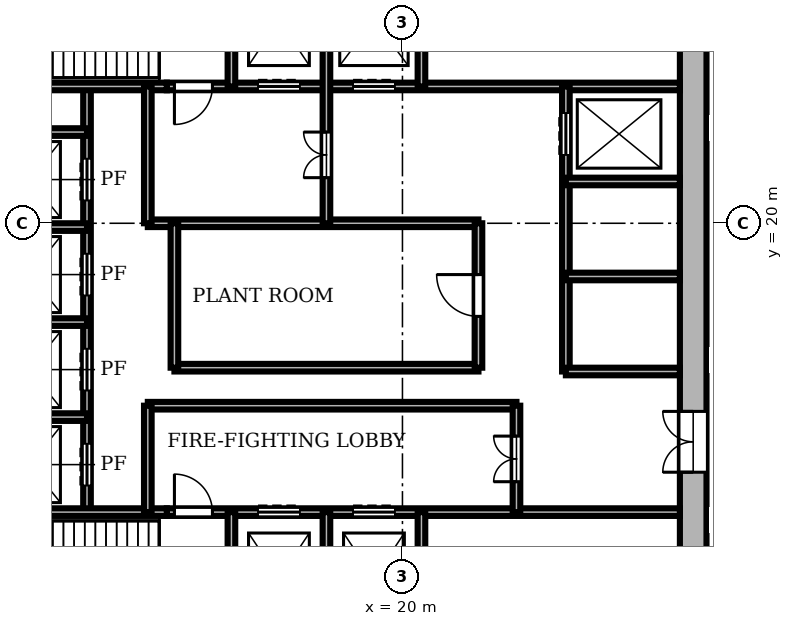
"""IFC4 building model, lengths in metres.
Left out: names, types, materials, properties, quantities, classifications, styles, units other than length and angle.
Written with IfcOpenShell. Run it as: python <this file> out.ifc"""

import sys

from ifc_helpers import new_model, si_unit, direction, frame, frame_2d, origin, place, context, subcontext, project, spatial, rectangle, extrude, element, fill, save


model = new_model("IFC4")
c1 = context("Model", 3, precision=1e-05, world=origin(), true_north=direction((0.0, 1.0)))
c2 = subcontext(c1, "Body", "Model", "MODEL_VIEW")
j1 = project(units=[si_unit("LENGTHUNIT", "METRE"), si_unit("PLANEANGLEUNIT", "RADIAN")], contexts=[c1])
p1 = place(None, origin())
s1 = spatial("IfcSite", under=j1, at=p1, CompositionType="ELEMENT")
p2 = place(p1, origin())
s2 = spatial("IfcBuilding", under=s1, at=p2, CompositionType="ELEMENT")
p3 = place(p2, frame((0.0, 0.0, 237.0)))
s3 = spatial("IfcBuildingStorey", under=s2, at=p3, CompositionType="ELEMENT", Elevation=237.0)
p4 = place(p3, frame((27.65, 8.7, 0.0), z_axis=(0.0, 0.0, 1.0), x_axis=(0.0, 1.0, 0.0)))
e1 = element("IfcWall", 1, at=p4, inside=s3, PredefinedType="SHEAR", context=c2, shape_type="SweptSolid", body=[
    extrude(rectangle(XDim=18.6, YDim=0.7, at=frame_2d((9.3, 0.0))), origin(), (0.0, 0.0, 1.0), 9.0),
])
p5 = place(p4, frame((4.75, 0.0, 0.0)))
e2 = element("IfcOpeningElement", 2, at=p5, cuts=e1, PredefinedType="OPENING", context=c2, shape_type="SweptSolid", body=[
    extrude(rectangle(XDim=1.6, YDim=2.1, at=frame_2d((0.8, 1.05))), frame((0.0, 0.36, 0.0), z_axis=(0.0, -1.0, 0.0), x_axis=(1.0, 0.0, 0.0)), (0.0, 0.0, 1.0), 0.72),
])
p6 = place(p3, frame((8.7, 12.4, 0.0), z_axis=(0.0, 0.0, 1.0), x_axis=(1.0, 0.0, 0.0)))
e3 = element("IfcWall", 3, at=p6, inside=s3, PredefinedType="SHEAR", context=c2, shape_type="SweptSolid", body=[
    extrude(rectangle(XDim=5.1, YDim=0.2, at=frame_2d((2.55, 0.0))), origin(), (0.0, 0.0, 1.0), 8.55),
])
p7 = place(p3, frame((13.8, 12.4, 0.0), z_axis=(0.0, 0.0, 1.0), x_axis=(1.0, 0.0, 0.0)))
e4 = element("IfcWall", 4, at=p7, inside=s3, PredefinedType="SHEAR", context=c2, shape_type="SweptSolid", body=[
    extrude(rectangle(XDim=13.5, YDim=0.2, at=frame_2d((6.75, 0.0))), origin(), (0.0, 0.0, 1.0), 8.55),
])
p8 = place(p7, frame((2.4, 0.0, 0.0)))
e5 = element("IfcOpeningElement", 5, at=p8, cuts=e4, PredefinedType="OPENING", context=c2, shape_type="SweptSolid", body=[
    extrude(rectangle(XDim=1.1, YDim=2.1, at=frame_2d((0.55, 1.05))), frame((0.0, 0.11, 0.0), z_axis=(0.0, -1.0, 0.0), x_axis=(1.0, 0.0, 0.0)), (0.0, 0.0, 1.0), 0.22),
])
p9 = place(p7, frame((4.9, 0.0, 0.0)))
e6 = element("IfcOpeningElement", 6, at=p9, cuts=e4, PredefinedType="OPENING", context=c2, shape_type="SweptSolid", body=[
    extrude(rectangle(XDim=1.1, YDim=2.1, at=frame_2d((0.55, 1.05))), frame((0.0, 0.11, 0.0), z_axis=(0.0, -1.0, 0.0), x_axis=(1.0, 0.0, 0.0)), (0.0, 0.0, 1.0), 0.22),
])
p10 = place(p7, frame((0.2, 0.0, 0.0)))
e7 = element("IfcOpeningElement", 7, at=p10, cuts=e4, PredefinedType="OPENING", context=c2, shape_type="SweptSolid", body=[
    extrude(rectangle(XDim=1.0, YDim=2.1, at=frame_2d((0.5, 1.05))), frame((0.0, 0.11, 0.0), z_axis=(0.0, -1.0, 0.0), x_axis=(1.0, 0.0, 0.0)), (0.0, 0.0, 1.0), 0.22),
])
p11 = place(p3, frame((8.7, 14.9, 0.0), z_axis=(0.0, 0.0, 1.0), x_axis=(1.0, 0.0, 0.0)))
e8 = element("IfcWall", 8, at=p11, inside=s3, PredefinedType="SHEAR", context=c2, shape_type="SweptSolid", body=[
    extrude(rectangle(XDim=3.0, YDim=0.2, at=frame_2d((1.5, 0.0))), origin(), (0.0, 0.0, 1.0), 8.55),
])
p12 = place(p3, frame((13.3, 15.2, 0.0), z_axis=(0.0, 0.0, 1.0), x_axis=(1.0, 0.0, 0.0)))
e9 = element("IfcWall", 9, at=p12, inside=s3, PredefinedType="SHEAR", context=c2, shape_type="SweptSolid", body=[
    extrude(rectangle(XDim=9.7, YDim=0.2, at=frame_2d((4.85, 0.0))), origin(), (0.0, 0.0, 1.0), 8.55),
])
p13 = place(p3, frame((24.3, 16.1, 0.0), z_axis=(0.0, 0.0, 1.0), x_axis=(1.0, 0.0, 0.0)))
e10 = element("IfcWall", 10, at=p13, inside=s3, PredefinedType="SHEAR", context=c2, shape_type="SweptSolid", body=[
    extrude(rectangle(XDim=3.0, YDim=0.2, at=frame_2d((1.5, 0.0))), origin(), (0.0, 0.0, 1.0), 8.55),
])
p14 = place(p3, frame((14.0, 16.2, 0.0), z_axis=(0.0, 0.0, 1.0), x_axis=(1.0, 0.0, 0.0)))
e11 = element("IfcWall", 11, at=p14, inside=s3, PredefinedType="SHEAR", context=c2, shape_type="SweptSolid", body=[
    extrude(rectangle(XDim=8.0, YDim=0.2, at=frame_2d((4.0, 0.0))), origin(), (0.0, 0.0, 1.0), 8.55),
])
for number, where, z_axis, x_axis in (
    (12, (8.7, 17.4, 0.0), (0.0, 0.0, 1.0), (1.0, 0.0, 0.0)),
    (13, (24.3, 18.6, 0.0), (0.0, 0.0, 1.0), (1.0, 0.0, 0.0)),
    (14, (8.7, 19.9, 0.0), (0.0, 0.0, 1.0), (1.0, 0.0, 0.0)),
):
    element("IfcWall", number, at=place(p3, frame(where, z_axis=z_axis, x_axis=x_axis)), inside=s3, PredefinedType="SHEAR", context=c2, shape_type="SweptSolid", body=[
        extrude(rectangle(XDim=3.0, YDim=0.2, at=frame_2d((1.5, 0.0))), origin(), (0.0, 0.0, 1.0), 8.55),
    ])
p15 = place(p3, frame((13.3, 20.0, 0.0), z_axis=(0.0, 0.0, 1.0), x_axis=(1.0, 0.0, 0.0)))
e15 = element("IfcWall", 15, at=p15, inside=s3, PredefinedType="SHEAR", context=c2, shape_type="SweptSolid", body=[
    extrude(rectangle(XDim=8.7, YDim=0.2, at=frame_2d((4.35, 0.0))), origin(), (0.0, 0.0, 1.0), 8.55),
])
for number, where, z_axis, x_axis in (
    (16, (24.3, 21.1, 0.0), (0.0, 0.0, 1.0), (1.0, 0.0, 0.0)),
    (17, (8.7, 22.4, 0.0), (0.0, 0.0, 1.0), (1.0, 0.0, 0.0)),
):
    element("IfcWall", number, at=place(p3, frame(where, z_axis=z_axis, x_axis=x_axis)), inside=s3, PredefinedType="SHEAR", context=c2, shape_type="SweptSolid", body=[
        extrude(rectangle(XDim=3.0, YDim=0.2, at=frame_2d((1.5, 0.0))), origin(), (0.0, 0.0, 1.0), 8.55),
    ])
p16 = place(p3, frame((8.7, 23.6, 0.0), z_axis=(0.0, 0.0, 1.0), x_axis=(1.0, 0.0, 0.0)))
e18 = element("IfcWall", 18, at=p16, inside=s3, PredefinedType="SHEAR", context=c2, shape_type="SweptSolid", body=[
    extrude(rectangle(XDim=5.1, YDim=0.2, at=frame_2d((2.55, 0.0))), origin(), (0.0, 0.0, 1.0), 8.55),
])
p17 = place(p3, frame((13.8, 23.6, 0.0), z_axis=(0.0, 0.0, 1.0), x_axis=(1.0, 0.0, 0.0)))
e19 = element("IfcWall", 19, at=p17, inside=s3, PredefinedType="SHEAR", context=c2, shape_type="SweptSolid", body=[
    extrude(rectangle(XDim=13.5, YDim=0.2, at=frame_2d((6.75, 0.0))), origin(), (0.0, 0.0, 1.0), 8.55),
])
p18 = place(p17, frame((2.4, 0.0, 0.0)))
e20 = element("IfcOpeningElement", 20, at=p18, cuts=e19, PredefinedType="OPENING", context=c2, shape_type="SweptSolid", body=[
    extrude(rectangle(XDim=1.1, YDim=2.1, at=frame_2d((0.55, 1.05))), frame((0.0, 0.11, 0.0), z_axis=(0.0, -1.0, 0.0), x_axis=(1.0, 0.0, 0.0)), (0.0, 0.0, 1.0), 0.22),
])
p19 = place(p17, frame((4.9, 0.0, 0.0)))
e21 = element("IfcOpeningElement", 21, at=p19, cuts=e19, PredefinedType="OPENING", context=c2, shape_type="SweptSolid", body=[
    extrude(rectangle(XDim=1.1, YDim=2.1, at=frame_2d((0.55, 1.05))), frame((0.0, 0.11, 0.0), z_axis=(0.0, -1.0, 0.0), x_axis=(1.0, 0.0, 0.0)), (0.0, 0.0, 1.0), 0.22),
])
p20 = place(p17, frame((0.2, 0.0, 0.0)))
e22 = element("IfcOpeningElement", 22, at=p20, cuts=e19, PredefinedType="OPENING", context=c2, shape_type="SweptSolid", body=[
    extrude(rectangle(XDim=1.0, YDim=2.1, at=frame_2d((0.5, 1.05))), frame((0.0, 0.11, 0.0), z_axis=(0.0, -1.0, 0.0), x_axis=(1.0, 0.0, 0.0)), (0.0, 0.0, 1.0), 0.22),
])
p21 = place(p3, frame((11.7, 12.4, 0.0), z_axis=(0.0, 0.0, 1.0), x_axis=(0.0, 1.0, 0.0)))
e23 = element("IfcWall", 23, at=p21, inside=s3, PredefinedType="SHEAR", context=c2, shape_type="SweptSolid", body=[
    extrude(rectangle(XDim=11.2, YDim=0.2, at=frame_2d((5.6, 0.0))), origin(), (0.0, 0.0, 1.0), 8.55),
])
p22 = place(p21, frame((0.7, 0.0, 0.0)))
e24 = element("IfcOpeningElement", 24, at=p22, cuts=e23, PredefinedType="OPENING", context=c2, shape_type="SweptSolid", body=[
    extrude(rectangle(XDim=1.1, YDim=2.1, at=frame_2d((0.55, 1.05))), frame((0.0, 0.11, 0.0), z_axis=(0.0, -1.0, 0.0), x_axis=(1.0, 0.0, 0.0)), (0.0, 0.0, 1.0), 0.22),
])
p23 = place(p21, frame((3.2, 0.0, 0.0)))
e25 = element("IfcOpeningElement", 25, at=p23, cuts=e23, PredefinedType="OPENING", context=c2, shape_type="SweptSolid", body=[
    extrude(rectangle(XDim=1.1, YDim=2.1, at=frame_2d((0.55, 1.05))), frame((0.0, 0.11, 0.0), z_axis=(0.0, -1.0, 0.0), x_axis=(1.0, 0.0, 0.0)), (0.0, 0.0, 1.0), 0.22),
])
p24 = place(p21, frame((5.7, 0.0, 0.0)))
e26 = element("IfcOpeningElement", 26, at=p24, cuts=e23, PredefinedType="OPENING", context=c2, shape_type="SweptSolid", body=[
    extrude(rectangle(XDim=1.1, YDim=2.1, at=frame_2d((0.55, 1.05))), frame((0.0, 0.11, 0.0), z_axis=(0.0, -1.0, 0.0), x_axis=(1.0, 0.0, 0.0)), (0.0, 0.0, 1.0), 0.22),
])
p25 = place(p21, frame((8.2, 0.0, 0.0)))
e27 = element("IfcOpeningElement", 27, at=p25, cuts=e23, PredefinedType="OPENING", context=c2, shape_type="SweptSolid", body=[
    extrude(rectangle(XDim=1.1, YDim=2.1, at=frame_2d((0.55, 1.05))), frame((0.0, 0.11, 0.0), z_axis=(0.0, -1.0, 0.0), x_axis=(1.0, 0.0, 0.0)), (0.0, 0.0, 1.0), 0.22),
])
p26 = place(p3, frame((13.3, 12.4, 0.0), z_axis=(0.0, 0.0, 1.0), x_axis=(0.0, 1.0, 0.0)))
e28 = element("IfcWall", 28, at=p26, inside=s3, PredefinedType="SHEAR", context=c2, shape_type="SweptSolid", body=[
    extrude(rectangle(XDim=2.8, YDim=0.2, at=frame_2d((1.4, 0.0))), origin(), (0.0, 0.0, 1.0), 8.55),
])
p27 = place(p3, frame((13.3, 20.0, 0.0), z_axis=(0.0, 0.0, 1.0), x_axis=(0.0, 1.0, 0.0)))
e29 = element("IfcWall", 29, at=p27, inside=s3, PredefinedType="SHEAR", context=c2, shape_type="SweptSolid", body=[
    extrude(rectangle(XDim=3.6, YDim=0.2, at=frame_2d((1.8, 0.0))), origin(), (0.0, 0.0, 1.0), 8.55),
])
p28 = place(p3, frame((14.0, 16.2, 0.0), z_axis=(0.0, 0.0, 1.0), x_axis=(0.0, 1.0, 0.0)))
e30 = element("IfcWall", 30, at=p28, inside=s3, PredefinedType="SHEAR", context=c2, shape_type="SweptSolid", body=[
    extrude(rectangle(XDim=3.8, YDim=0.2, at=frame_2d((1.9, 0.0))), origin(), (0.0, 0.0, 1.0), 8.55),
])
for number, where, z_axis, x_axis in (
    (31, (15.5, 8.7, 0.0), (0.0, 0.0, 1.0), (0.0, 1.0, 0.0)),
    (32, (15.5, 23.6, 0.0), (0.0, 0.0, 1.0), (0.0, 1.0, 0.0)),
    (33, (18.0, 8.7, 0.0), (0.0, 0.0, 1.0), (0.0, 1.0, 0.0)),
):
    element("IfcWall", number, at=place(p3, frame(where, z_axis=z_axis, x_axis=x_axis)), inside=s3, PredefinedType="SHEAR", context=c2, shape_type="SweptSolid", body=[
        extrude(rectangle(XDim=3.7, YDim=0.2, at=frame_2d((1.85, 0.0))), origin(), (0.0, 0.0, 1.0), 8.55),
    ])
p29 = place(p3, frame((18.0, 20.0, 0.0), z_axis=(0.0, 0.0, 1.0), x_axis=(0.0, 1.0, 0.0)))
e34 = element("IfcWall", 34, at=p29, inside=s3, PredefinedType="SHEAR", context=c2, shape_type="SweptSolid", body=[
    extrude(rectangle(XDim=7.3, YDim=0.2, at=frame_2d((3.65, 0.0))), origin(), (0.0, 0.0, 1.0), 8.55),
])
p30 = place(p29, frame((1.2, 0.0, 0.0)))
e35 = element("IfcOpeningElement", 35, at=p30, cuts=e34, PredefinedType="OPENING", context=c2, shape_type="SweptSolid", body=[
    extrude(rectangle(XDim=1.2, YDim=2.1, at=frame_2d((0.6, 1.05))), frame((0.0, 0.11, 0.0), z_axis=(0.0, -1.0, 0.0), x_axis=(1.0, 0.0, 0.0)), (0.0, 0.0, 1.0), 0.22),
])
for number, where, z_axis, x_axis in (
    (36, (20.5, 8.7, 0.0), (0.0, 0.0, 1.0), (0.0, 1.0, 0.0)),
    (37, (20.5, 23.6, 0.0), (0.0, 0.0, 1.0), (0.0, 1.0, 0.0)),
):
    element("IfcWall", number, at=place(p3, frame(where, z_axis=z_axis, x_axis=x_axis)), inside=s3, PredefinedType="SHEAR", context=c2, shape_type="SweptSolid", body=[
        extrude(rectangle(XDim=3.7, YDim=0.2, at=frame_2d((1.85, 0.0))), origin(), (0.0, 0.0, 1.0), 8.55),
    ])
p31 = place(p3, frame((22.0, 16.2, 0.0), z_axis=(0.0, 0.0, 1.0), x_axis=(0.0, 1.0, 0.0)))
e38 = element("IfcWall", 38, at=p31, inside=s3, PredefinedType="SHEAR", context=c2, shape_type="SweptSolid", body=[
    extrude(rectangle(XDim=3.8, YDim=0.2, at=frame_2d((1.9, 0.0))), origin(), (0.0, 0.0, 1.0), 8.55),
])
p32 = place(p31, frame((1.35, 0.0, 0.0)))
e39 = element("IfcOpeningElement", 39, at=p32, cuts=e38, PredefinedType="OPENING", context=c2, shape_type="SweptSolid", body=[
    extrude(rectangle(XDim=1.1, YDim=2.1, at=frame_2d((0.55, 1.05))), frame((0.0, 0.11, 0.0), z_axis=(0.0, -1.0, 0.0), x_axis=(1.0, 0.0, 0.0)), (0.0, 0.0, 1.0), 0.22),
])
p33 = place(p3, frame((23.0, 12.4, 0.0), z_axis=(0.0, 0.0, 1.0), x_axis=(0.0, 1.0, 0.0)))
e40 = element("IfcWall", 40, at=p33, inside=s3, PredefinedType="SHEAR", context=c2, shape_type="SweptSolid", body=[
    extrude(rectangle(XDim=2.8, YDim=0.2, at=frame_2d((1.4, 0.0))), origin(), (0.0, 0.0, 1.0), 8.55),
])
p34 = place(p33, frame((0.8, 0.0, 0.0)))
e41 = element("IfcOpeningElement", 41, at=p34, cuts=e40, PredefinedType="OPENING", context=c2, shape_type="SweptSolid", body=[
    extrude(rectangle(XDim=1.2, YDim=2.1, at=frame_2d((0.6, 1.05))), frame((0.0, 0.11, 0.0), z_axis=(0.0, -1.0, 0.0), x_axis=(1.0, 0.0, 0.0)), (0.0, 0.0, 1.0), 0.22),
])
p35 = place(p3, frame((24.3, 16.1, 0.0), z_axis=(0.0, 0.0, 1.0), x_axis=(0.0, 1.0, 0.0)))
e42 = element("IfcWall", 42, at=p35, inside=s3, PredefinedType="SHEAR", context=c2, shape_type="SweptSolid", body=[
    extrude(rectangle(XDim=7.5, YDim=0.2, at=frame_2d((3.75, 0.0))), origin(), (0.0, 0.0, 1.0), 8.55),
])
p36 = place(p35, frame((5.7, 0.0, 0.0)))
e43 = element("IfcOpeningElement", 43, at=p36, cuts=e42, PredefinedType="OPENING", context=c2, shape_type="SweptSolid", body=[
    extrude(rectangle(XDim=1.1, YDim=2.1, at=frame_2d((0.55, 1.05))), frame((0.0, 0.11, 0.0), z_axis=(0.0, -1.0, 0.0), x_axis=(1.0, 0.0, 0.0)), (0.0, 0.0, 1.0), 0.22),
])
for number, where, z_axis, x_axis in (
    (44, (8.8, 12.6, 7.5), (0.0, 0.0, 1.0), (1.0, 0.0, 0.0)),
    (45, (8.8, 14.7, 7.5), (0.0, 0.0, 1.0), (1.0, 0.0, 0.0)),
):
    element("IfcWall", number, at=place(p3, frame(where, z_axis=z_axis, x_axis=x_axis)), inside=s3, PredefinedType="SOLIDWALL", context=c2, shape_type="SweptSolid", body=[
        extrude(rectangle(XDim=2.8, YDim=0.2, at=frame_2d((1.4, 0.0))), origin(), (0.0, 0.0, 1.0), 1.5),
    ])
p37 = place(p3, frame((11.5, 12.7, 7.5), z_axis=(0.0, 0.0, 1.0), x_axis=(0.0, 1.0, 0.0)))
e46 = element("IfcWall", 46, at=p37, inside=s3, PredefinedType="SOLIDWALL", context=c2, shape_type="SweptSolid", body=[
    extrude(rectangle(XDim=1.9, YDim=0.2, at=frame_2d((0.95, 0.0))), origin(), (0.0, 0.0, 1.0), 1.5),
])
for number, where, z_axis, x_axis in (
    (47, (8.8, 15.1, 7.5), (0.0, 0.0, 1.0), (1.0, 0.0, 0.0)),
    (48, (8.8, 17.2, 7.5), (0.0, 0.0, 1.0), (1.0, 0.0, 0.0)),
):
    element("IfcWall", number, at=place(p3, frame(where, z_axis=z_axis, x_axis=x_axis)), inside=s3, PredefinedType="SOLIDWALL", context=c2, shape_type="SweptSolid", body=[
        extrude(rectangle(XDim=2.8, YDim=0.2, at=frame_2d((1.4, 0.0))), origin(), (0.0, 0.0, 1.0), 1.5),
    ])
p38 = place(p3, frame((11.5, 15.2, 7.5), z_axis=(0.0, 0.0, 1.0), x_axis=(0.0, 1.0, 0.0)))
e49 = element("IfcWall", 49, at=p38, inside=s3, PredefinedType="SOLIDWALL", context=c2, shape_type="SweptSolid", body=[
    extrude(rectangle(XDim=1.9, YDim=0.2, at=frame_2d((0.95, 0.0))), origin(), (0.0, 0.0, 1.0), 1.5),
])
for number, where, z_axis, x_axis in (
    (50, (8.8, 17.6, 7.5), (0.0, 0.0, 1.0), (1.0, 0.0, 0.0)),
    (51, (8.8, 19.7, 7.5), (0.0, 0.0, 1.0), (1.0, 0.0, 0.0)),
):
    element("IfcWall", number, at=place(p3, frame(where, z_axis=z_axis, x_axis=x_axis)), inside=s3, PredefinedType="SOLIDWALL", context=c2, shape_type="SweptSolid", body=[
        extrude(rectangle(XDim=2.8, YDim=0.2, at=frame_2d((1.4, 0.0))), origin(), (0.0, 0.0, 1.0), 1.5),
    ])
p39 = place(p3, frame((11.5, 17.7, 7.5), z_axis=(0.0, 0.0, 1.0), x_axis=(0.0, 1.0, 0.0)))
e52 = element("IfcWall", 52, at=p39, inside=s3, PredefinedType="SOLIDWALL", context=c2, shape_type="SweptSolid", body=[
    extrude(rectangle(XDim=1.9, YDim=0.2, at=frame_2d((0.95, 0.0))), origin(), (0.0, 0.0, 1.0), 1.5),
])
for number, where, z_axis, x_axis in (
    (53, (8.8, 20.1, 7.5), (0.0, 0.0, 1.0), (1.0, 0.0, 0.0)),
    (54, (8.8, 22.2, 7.5), (0.0, 0.0, 1.0), (1.0, 0.0, 0.0)),
):
    element("IfcWall", number, at=place(p3, frame(where, z_axis=z_axis, x_axis=x_axis)), inside=s3, PredefinedType="SOLIDWALL", context=c2, shape_type="SweptSolid", body=[
        extrude(rectangle(XDim=2.8, YDim=0.2, at=frame_2d((1.4, 0.0))), origin(), (0.0, 0.0, 1.0), 1.5),
    ])
p40 = place(p3, frame((11.5, 20.2, 7.5), z_axis=(0.0, 0.0, 1.0), x_axis=(0.0, 1.0, 0.0)))
e55 = element("IfcWall", 55, at=p40, inside=s3, PredefinedType="SOLIDWALL", context=c2, shape_type="SweptSolid", body=[
    extrude(rectangle(XDim=1.9, YDim=0.2, at=frame_2d((0.95, 0.0))), origin(), (0.0, 0.0, 1.0), 1.5),
])
p41 = place(p22, origin())
e56 = element("IfcDoor", 56, at=p41, inside=s3, OperationType="DOUBLE_DOOR_SLIDING", PredefinedType="DOOR", context=c2, shape_type="SweptSolid", body=[
    extrude(rectangle(XDim=1.1, YDim=2.1, at=frame_2d((0.55, 1.05))), frame((0.0, 0.025, 0.0), z_axis=(0.0, -1.0, 0.0), x_axis=(1.0, 0.0, 0.0)), (0.0, 0.0, 1.0), 0.05),
])
fill(e24, e56)
p42 = place(p23, origin())
e57 = element("IfcDoor", 57, at=p42, inside=s3, OperationType="DOUBLE_DOOR_SLIDING", PredefinedType="DOOR", context=c2, shape_type="SweptSolid", body=[
    extrude(rectangle(XDim=1.1, YDim=2.1, at=frame_2d((0.55, 1.05))), frame((0.0, 0.025, 0.0), z_axis=(0.0, -1.0, 0.0), x_axis=(1.0, 0.0, 0.0)), (0.0, 0.0, 1.0), 0.05),
])
fill(e25, e57)
p43 = place(p24, origin())
e58 = element("IfcDoor", 58, at=p43, inside=s3, OperationType="DOUBLE_DOOR_SLIDING", PredefinedType="DOOR", context=c2, shape_type="SweptSolid", body=[
    extrude(rectangle(XDim=1.1, YDim=2.1, at=frame_2d((0.55, 1.05))), frame((0.0, 0.025, 0.0), z_axis=(0.0, -1.0, 0.0), x_axis=(1.0, 0.0, 0.0)), (0.0, 0.0, 1.0), 0.05),
])
fill(e26, e58)
p44 = place(p25, origin())
e59 = element("IfcDoor", 59, at=p44, inside=s3, OperationType="DOUBLE_DOOR_SLIDING", PredefinedType="DOOR", context=c2, shape_type="SweptSolid", body=[
    extrude(rectangle(XDim=1.1, YDim=2.1, at=frame_2d((0.55, 1.05))), frame((0.0, 0.025, 0.0), z_axis=(0.0, -1.0, 0.0), x_axis=(1.0, 0.0, 0.0)), (0.0, 0.0, 1.0), 0.05),
])
fill(e27, e59)
p45 = place(p36, origin())
e60 = element("IfcDoor", 60, at=p45, inside=s3, OperationType="DOUBLE_DOOR_SLIDING", PredefinedType="DOOR", context=c2, shape_type="SweptSolid", body=[
    extrude(rectangle(XDim=1.1, YDim=2.1, at=frame_2d((0.55, 1.05))), frame((0.0, 0.025, 0.0), z_axis=(0.0, -1.0, 0.0), x_axis=(1.0, 0.0, 0.0)), (0.0, 0.0, 1.0), 0.05),
])
fill(e43, e60)
p46 = place(p8, origin())
e61 = element("IfcDoor", 61, at=p46, inside=s3, OperationType="DOUBLE_DOOR_SLIDING", PredefinedType="DOOR", context=c2, shape_type="SweptSolid", body=[
    extrude(rectangle(XDim=1.1, YDim=2.1, at=frame_2d((0.55, 1.05))), frame((0.0, 0.025, 0.0), z_axis=(0.0, -1.0, 0.0), x_axis=(1.0, 0.0, 0.0)), (0.0, 0.0, 1.0), 0.05),
])
fill(e5, e61)
p47 = place(p9, origin())
e62 = element("IfcDoor", 62, at=p47, inside=s3, OperationType="DOUBLE_DOOR_SLIDING", PredefinedType="DOOR", context=c2, shape_type="SweptSolid", body=[
    extrude(rectangle(XDim=1.1, YDim=2.1, at=frame_2d((0.55, 1.05))), frame((0.0, 0.025, 0.0), z_axis=(0.0, -1.0, 0.0), x_axis=(1.0, 0.0, 0.0)), (0.0, 0.0, 1.0), 0.05),
])
fill(e6, e62)
p48 = place(p18, origin())
e63 = element("IfcDoor", 63, at=p48, inside=s3, OperationType="DOUBLE_DOOR_SLIDING", PredefinedType="DOOR", context=c2, shape_type="SweptSolid", body=[
    extrude(rectangle(XDim=1.1, YDim=2.1, at=frame_2d((0.55, 1.05))), frame((0.0, 0.025, 0.0), z_axis=(0.0, -1.0, 0.0), x_axis=(1.0, 0.0, 0.0)), (0.0, 0.0, 1.0), 0.05),
])
fill(e20, e63)
p49 = place(p19, origin())
e64 = element("IfcDoor", 64, at=p49, inside=s3, OperationType="DOUBLE_DOOR_SLIDING", PredefinedType="DOOR", context=c2, shape_type="SweptSolid", body=[
    extrude(rectangle(XDim=1.1, YDim=2.1, at=frame_2d((0.55, 1.05))), frame((0.0, 0.025, 0.0), z_axis=(0.0, -1.0, 0.0), x_axis=(1.0, 0.0, 0.0)), (0.0, 0.0, 1.0), 0.05),
])
fill(e21, e64)
p50 = place(p10, origin())
e65 = element("IfcDoor", 65, at=p50, inside=s3, OperationType="SINGLE_SWING_LEFT", PredefinedType="DOOR", context=c2, shape_type="SweptSolid", body=[
    extrude(rectangle(XDim=1.0, YDim=2.1, at=frame_2d((0.5, 1.05))), frame((0.0, 0.025, 0.0), z_axis=(0.0, -1.0, 0.0), x_axis=(1.0, 0.0, 0.0)), (0.0, 0.0, 1.0), 0.05),
])
fill(e7, e65)
p51 = place(p20, frame((1.0, 0.0, 0.0), z_axis=(0.0, 0.0, 1.0), x_axis=(-1.0, 0.0, 0.0)))
e66 = element("IfcDoor", 66, at=p51, inside=s3, OperationType="SINGLE_SWING_RIGHT", PredefinedType="DOOR", context=c2, shape_type="SweptSolid", body=[
    extrude(rectangle(XDim=1.0, YDim=2.1, at=frame_2d((0.5, 1.05))), frame((0.0, 0.025, 0.0), z_axis=(0.0, -1.0, 0.0), x_axis=(1.0, 0.0, 0.0)), (0.0, 0.0, 1.0), 0.05),
])
fill(e22, e66)
p52 = place(p34, origin())
e67 = element("IfcDoor", 67, at=p52, inside=s3, OperationType="DOUBLE_DOOR_SINGLE_SWING", PredefinedType="DOOR", context=c2, shape_type="SweptSolid", body=[
    extrude(rectangle(XDim=1.2, YDim=2.1, at=frame_2d((0.6, 1.05))), frame((0.0, 0.025, 0.0), z_axis=(0.0, -1.0, 0.0), x_axis=(1.0, 0.0, 0.0)), (0.0, 0.0, 1.0), 0.05),
])
fill(e41, e67)
p53 = place(p30, origin())
e68 = element("IfcDoor", 68, at=p53, inside=s3, OperationType="DOUBLE_DOOR_SINGLE_SWING", PredefinedType="DOOR", context=c2, shape_type="SweptSolid", body=[
    extrude(rectangle(XDim=1.2, YDim=2.1, at=frame_2d((0.6, 1.05))), frame((0.0, 0.025, 0.0), z_axis=(0.0, -1.0, 0.0), x_axis=(1.0, 0.0, 0.0)), (0.0, 0.0, 1.0), 0.05),
])
fill(e35, e68)
p54 = place(p32, origin())
e69 = element("IfcDoor", 69, at=p54, inside=s3, OperationType="SINGLE_SWING_RIGHT", PredefinedType="DOOR", context=c2, shape_type="SweptSolid", body=[
    extrude(rectangle(XDim=1.1, YDim=2.1, at=frame_2d((0.55, 1.05))), frame((0.0, 0.025, 0.0), z_axis=(0.0, -1.0, 0.0), x_axis=(1.0, 0.0, 0.0)), (0.0, 0.0, 1.0), 0.05),
])
fill(e39, e69)
p55 = place(p5, origin())
e70 = element("IfcDoor", 70, at=p55, inside=s3, OperationType="DOUBLE_DOOR_SINGLE_SWING", PredefinedType="DOOR", context=c2, shape_type="SweptSolid", body=[
    extrude(rectangle(XDim=1.6, YDim=2.1, at=frame_2d((0.8, 1.05))), frame((0.0, 0.025, 0.0), z_axis=(0.0, -1.0, 0.0), x_axis=(1.0, 0.0, 0.0)), (0.0, 0.0, 1.0), 0.05),
])
fill(e2, e70)
save(model, sys.argv[1])
